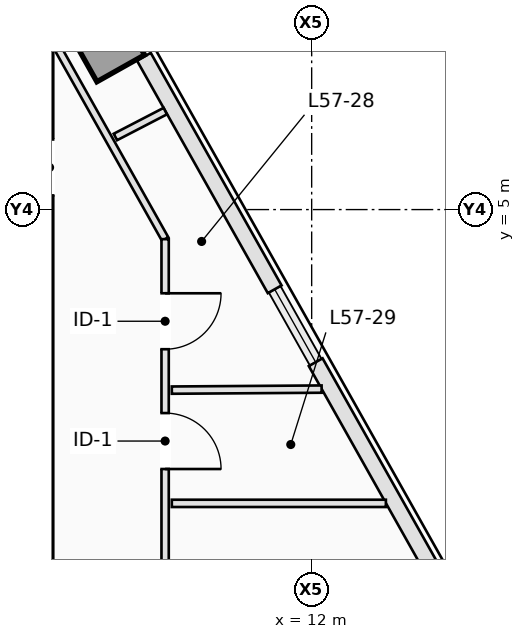
"""IFC4 building model, lengths in metres.
Left out: names, types, materials, properties, quantities, classifications, styles, units other than length and angle.
Written with IfcOpenShell. Run it as: python <this file> out.ifc"""

import sys

from ifc_helpers import new_model, si_unit, direction, frame, frame_2d, origin, origin_2d, place, context, subcontext, project, spatial, rectangle, extrude, element, fill, save


model = new_model("IFC4")
c1 = context("Model", 3, precision=1e-05, world=origin(), true_north=direction((0.0, 1.0)))
c2 = subcontext(c1, "Body", "Model", "MODEL_VIEW")
j1 = project(units=[si_unit("LENGTHUNIT", "METRE"), si_unit("PLANEANGLEUNIT", "RADIAN")], contexts=[c1])
p1 = place(None, origin())
s1 = spatial("IfcSite", under=j1, at=p1, CompositionType="ELEMENT")
p2 = place(p1, origin())
s2 = spatial("IfcBuilding", under=s1, at=p2, CompositionType="ELEMENT")
p3 = place(p2, frame((0.0, 0.0, 207.9)))
s3 = spatial("IfcBuildingStorey", under=s2, at=p3, CompositionType="ELEMENT", Elevation=207.9)
p4 = place(p3, frame((8.64, 7.715, 0.0), z_axis=(0.0, 0.0, 1.0), x_axis=(0.871575139605, 0.490261946333, 0.0)))
e1 = element("IfcColumn", 1, at=p4, inside=s3, PredefinedType="COLUMN", context=c2, shape_type="SweptSolid", body=[
    extrude(rectangle(XDim=0.9, YDim=0.9, at=origin_2d()), origin(), (0.0, 0.0, 1.0), 3.5),
])
p5 = place(p3, frame((9.24, 7.514, 0.0), z_axis=(0.0, 0.0, 1.0), x_axis=(0.490237464814, -0.871588910033, 0.0)))
e2 = element("IfcWall", 2, at=p5, inside=s3, PredefinedType="STANDARD", context=c2, shape_type="SweptSolid", body=[
    extrude(rectangle(XDim=4.388, YDim=0.26, at=frame_2d((2.194, 0.0))), origin(), (0.0, 0.0, 1.0), 3.25),
])
p6 = place(p3, frame((12.066, 2.49, 0.0), z_axis=(0.0, 0.0, 1.0), x_axis=(0.490261239633, -0.871575537125, 0.0)))
e3 = element("IfcWall", 3, at=p6, inside=s3, PredefinedType="STANDARD", context=c2, shape_type="SweptSolid", body=[
    extrude(rectangle(XDim=4.388, YDim=0.26, at=frame_2d((2.194, 0.0))), origin(), (0.0, 0.0, 1.0), 3.25),
])
p7 = place(p3, frame((7.69, -2.338, 0.0), z_axis=(0.0, 0.0, 1.0), x_axis=(0.0, 1.0, 0.0)))
e4 = element("IfcWall", 4, at=p7, inside=s3, PredefinedType="PARTITIONING", context=c2, shape_type="SweptSolid", body=[
    extrude(rectangle(XDim=10.232, YDim=0.12, at=frame_2d((5.116, 0.0))), origin(), (0.0, 0.0, 1.0), 3.25),
])
p8 = place(p7, frame((7.571, 0.0, 0.0)))
e5 = element("IfcOpeningElement", 5, at=p8, cuts=e4, PredefinedType="OPENING", context=c2, shape_type="SweptSolid", body=[
    extrude(rectangle(XDim=0.92, YDim=2.12, at=frame_2d((0.46, 1.06))), frame((0.0, 0.07, 0.0), z_axis=(0.0, -1.0, 0.0), x_axis=(1.0, 0.0, 0.0)), (0.0, 0.0, 1.0), 0.14),
])
p9 = place(p3, frame((7.752, 7.783, 0.0), z_axis=(0.0, 0.0, 1.0), x_axis=(0.490285973315, -0.871561623966, 0.0)))
e6 = element("IfcWall", 6, at=p9, inside=s3, PredefinedType="PARTITIONING", context=c2, shape_type="SweptSolid", body=[
    extrude(rectangle(XDim=3.749, YDim=0.12, at=frame_2d((1.875, 0.0))), origin(), (0.0, 0.0, 1.0), 3.25),
])
p10 = place(p3, frame((9.59, 4.514, 0.0), z_axis=(0.0, 0.0, 1.0), x_axis=(0.0, -1.0, 0.0)))
e7 = element("IfcWall", 7, at=p10, inside=s3, PredefinedType="PARTITIONING", context=c2, shape_type="SweptSolid", body=[
    extrude(rectangle(XDim=6.914, YDim=0.12, at=frame_2d((3.457, 0.0))), origin(), (0.0, 0.0, 1.0), 3.25),
])
p11 = place(p10, frame((0.89, 0.0, 0.0)))
e8 = element("IfcOpeningElement", 8, at=p11, cuts=e7, PredefinedType="OPENING", context=c2, shape_type="SweptSolid", body=[
    extrude(rectangle(XDim=0.92, YDim=2.12, at=frame_2d((0.46, 1.06))), frame((0.0, 0.07, 0.0), z_axis=(0.0, -1.0, 0.0), x_axis=(1.0, 0.0, 0.0)), (0.0, 0.0, 1.0), 0.14),
])
p12 = place(p10, frame((2.86, 0.0, 0.0)))
e9 = element("IfcOpeningElement", 9, at=p12, cuts=e7, PredefinedType="OPENING", context=c2, shape_type="SweptSolid", body=[
    extrude(rectangle(XDim=0.92, YDim=2.12, at=frame_2d((0.46, 1.06))), frame((0.0, 0.07, 0.0), z_axis=(0.0, -1.0, 0.0), x_axis=(1.0, 0.0, 0.0)), (0.0, 0.0, 1.0), 0.14),
])
p13 = place(p3, frame((9.592, 6.619, 0.0), z_axis=(0.0, 0.0, 1.0), x_axis=(-0.887774537441, -0.460278579418, 0.0)))
e10 = element("IfcWall", 10, at=p13, inside=s3, PredefinedType="PARTITIONING", context=c2, shape_type="SweptSolid", body=[
    extrude(rectangle(XDim=0.923, YDim=0.12, at=frame_2d((0.462, 0.0))), origin(), (0.0, 0.0, 1.0), 3.25),
])
p14 = place(p3, frame((12.164, 2.048, 0.0), z_axis=(0.0, 0.0, 1.0), x_axis=(-0.999976623228, -0.006837616391, 0.0)))
e11 = element("IfcWall", 11, at=p14, inside=s3, PredefinedType="PARTITIONING", context=c2, shape_type="SweptSolid", body=[
    extrude(rectangle(XDim=2.464, YDim=0.12, at=frame_2d((1.232, 0.0))), origin(), (0.0, 0.0, 1.0), 3.25),
])
p15 = place(p3, frame((13.22, 0.169, 0.0), z_axis=(0.0, 0.0, 1.0), x_axis=(-1.0, 0.0, 0.0)))
e12 = element("IfcWall", 12, at=p15, inside=s3, PredefinedType="PARTITIONING", context=c2, shape_type="SweptSolid", body=[
    extrude(rectangle(XDim=3.521, YDim=0.12, at=frame_2d((1.76, 0.0))), origin(), (0.0, 0.0, 1.0), 3.25),
])
p16 = place(p11, origin())
e13 = element("IfcDoor", 13, at=p16, inside=s3, OperationType="SINGLE_SWING_LEFT", PredefinedType="DOOR", context=c2, shape_type="SweptSolid", body=[
    extrude(rectangle(XDim=0.92, YDim=2.12, at=frame_2d((0.46, 1.06))), frame((0.0, 0.025, 0.0), z_axis=(0.0, -1.0, 0.0), x_axis=(1.0, 0.0, 0.0)), (0.0, 0.0, 1.0), 0.05),
])
fill(e8, e13)
p17 = place(p12, origin())
e14 = element("IfcDoor", 14, at=p17, inside=s3, OperationType="SINGLE_SWING_RIGHT", PredefinedType="DOOR", context=c2, shape_type="SweptSolid", body=[
    extrude(rectangle(XDim=0.92, YDim=2.12, at=frame_2d((0.46, 1.06))), frame((0.0, 0.025, 0.0), z_axis=(0.0, -1.0, 0.0), x_axis=(1.0, 0.0, 0.0)), (0.0, 0.0, 1.0), 0.05),
])
fill(e9, e14)
save(model, sys.argv[1])
